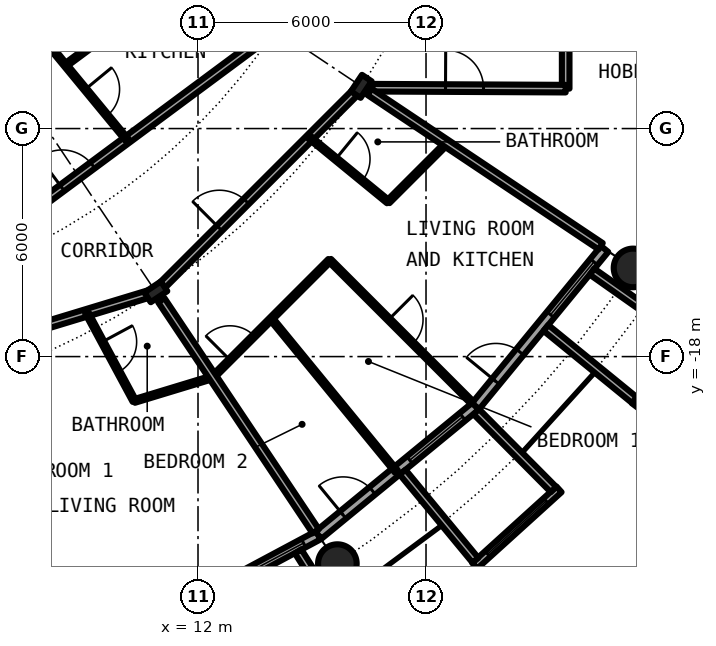
"""IFC4 building model, lengths in metres.
Left out: names, types, materials, properties, quantities, classifications, styles, units other than length and angle.
Written with IfcOpenShell. Run it as: python <this file> out.ifc"""

import sys

from ifc_helpers import new_model, si_unit, direction, frame, frame_2d, origin, origin_2d, place, context, subcontext, project, spatial, rectangle, circle, hollow_circle, i_section, extrude, element, fill, save


model = new_model("IFC4")
c1 = context("Model", 3, precision=1e-05, world=origin(), true_north=direction((0.0, 1.0)))
c2 = subcontext(c1, "Body", "Model", "MODEL_VIEW")
j1 = project(units=[si_unit("LENGTHUNIT", "METRE"), si_unit("PLANEANGLEUNIT", "RADIAN")], contexts=[c1])
p1 = place(None, origin())
s1 = spatial("IfcSite", under=j1, at=p1, CompositionType="ELEMENT")
p2 = place(p1, origin())
s2 = spatial("IfcBuilding", under=s1, at=p2, CompositionType="ELEMENT")
p3 = place(p2, frame((0.0, 0.0, 69.7)))
s3 = spatial("IfcBuildingStorey", under=s2, at=p3, CompositionType="ELEMENT", Elevation=69.7)
for number, where, z_axis, x_axis in (
    (1, (15.667, -23.448, 0.0), (0.0, 0.0, 1.0), (1.0, 0.0, 0.0)),
    (2, (23.448, -15.667, 0.0), (0.0, 0.0, 1.0), (1.0, 0.0, 0.0)),
):
    element("IfcColumn", number, at=place(p3, frame(where, z_axis=z_axis, x_axis=x_axis)), inside=s3, PredefinedType="COLUMN", context=c2, shape_type="SweptSolid", body=[
        extrude(hollow_circle(Radius=0.508, WallThickness=0.04, at=origin_2d()), origin(), (0.0, 0.0, 1.0), 3.05),
    ])
for number, where, z_axis, x_axis in (
    (3, (10.889, -16.297, 0.0), (0.0, 0.0, 1.0), (0.556, -0.831, 0.0)),
    (4, (16.297, -10.889, 0.0), (0.0, 0.0, 1.0), (0.831, -0.556, 0.0)),
):
    element("IfcColumn", number, at=place(p3, frame(where, z_axis=z_axis, x_axis=x_axis)), inside=s3, PredefinedType="COLUMN", context=c2, shape_type="SweptSolid", body=[
        extrude(i_section(OverallWidth=0.306, OverallDepth=0.524, WebThickness=0.021, FlangeThickness=0.04, FilletRadius=0.027, at=origin_2d()), origin(), (0.0, 0.0, 1.0), 3.05),
    ])
p4 = place(p3, frame((10.447, -25.222, 0.0), z_axis=(0.0, 0.0, 1.0), x_axis=(0.881915646801, 0.471407246368, 0.0)))
e5 = element("IfcWall", 5, at=p4, inside=s3, PredefinedType="SOLIDWALL", context=c2, shape_type="SweptSolid", body=[
    extrude(rectangle(XDim=5.352, YDim=0.25, at=frame_2d((2.676, 0.0))), origin(), (0.0, 0.0, 1.0), 2.7),
])
p5 = place(p4, frame((0.841, 0.0, 0.0)))
e6 = element("IfcOpeningElement", 6, at=p5, cuts=e5, PredefinedType="OPENING", context=c2, shape_type="SweptSolid", body=[
    extrude(rectangle(XDim=1.0, YDim=2.2, at=frame_2d((0.5, 1.1))), frame((0.0, 0.135, 0.0), z_axis=(0.0, -1.0, 0.0), x_axis=(1.0, 0.0, 0.0)), (0.0, 0.0, 1.0), 0.27),
])
p6 = place(p4, frame((3.111, 0.0, 0.3)))
e7 = element("IfcOpeningElement", 7, at=p6, cuts=e5, PredefinedType="OPENING", context=c2, shape_type="SweptSolid", body=[
    extrude(rectangle(XDim=1.8, YDim=2.1, at=frame_2d((0.9, 1.05))), frame((0.0, 0.135, 0.0), z_axis=(0.0, -1.0, 0.0), x_axis=(1.0, 0.0, 0.0)), (0.0, 0.0, 1.0), 0.27),
])
p7 = place(p3, frame((14.635, -23.126, -0.03), z_axis=(0.0, 0.0, 1.0), x_axis=(0.534437802731, -0.845207805816, 0.0)))
e8 = element("IfcWall", 8, at=p7, inside=s3, PredefinedType="SOLIDWALL", context=c2, shape_type="SweptSolid", body=[
    extrude(rectangle(XDim=2.932, YDim=0.2, at=frame_2d((1.466, 0.0))), origin(), (0.0, 0.0, 1.0), 2.73),
])
p8 = place(p3, frame((15.167, -22.699, 0.0), z_axis=(0.0, 0.0, 1.0), x_axis=(0.773019449054, 0.634382322723, 0.0)))
e9 = element("IfcWall", 9, at=p8, inside=s3, PredefinedType="SOLIDWALL", context=c2, shape_type="SweptSolid", body=[
    extrude(rectangle(XDim=5.352, YDim=0.25, at=frame_2d((2.676, 0.0))), origin(), (0.0, 0.0, 1.0), 2.7),
])
p9 = place(p8, frame((0.841, 0.0, 0.0)))
e10 = element("IfcOpeningElement", 10, at=p9, cuts=e9, PredefinedType="OPENING", context=c2, shape_type="SweptSolid", body=[
    extrude(rectangle(XDim=1.0, YDim=2.2, at=frame_2d((0.5, 1.1))), frame((0.0, 0.135, 0.0), z_axis=(0.0, -1.0, 0.0), x_axis=(1.0, 0.0, 0.0)), (0.0, 0.0, 1.0), 0.27),
])
p10 = place(p8, frame((3.111, 0.0, 0.3)))
e11 = element("IfcOpeningElement", 11, at=p10, cuts=e9, PredefinedType="OPENING", context=c2, shape_type="SweptSolid", body=[
    extrude(rectangle(XDim=1.8, YDim=2.1, at=frame_2d((0.9, 1.05))), frame((0.0, 0.135, 0.0), z_axis=(0.0, -1.0, 0.0), x_axis=(1.0, 0.0, 0.0)), (0.0, 0.0, 1.0), 0.27),
])
p11 = place(p3, frame((19.282, -23.503, -0.03), z_axis=(0.0, 0.0, 1.0), x_axis=(0.740998365753, 0.671506829416, 0.0)))
e12 = element("IfcWall", 12, at=p11, inside=s3, PredefinedType="SOLIDWALL", context=c2, shape_type="SweptSolid", body=[
    extrude(rectangle(XDim=2.993, YDim=0.2, at=frame_2d((1.497, 0.0))), origin(), (0.0, 0.0, 1.0), 2.73),
])
p12 = place(p11, frame((0.457, 0.0, 0.33)))
e13 = element("IfcOpeningElement", 13, at=p12, cuts=e12, PredefinedType="OPENING", context=c2, shape_type="SweptSolid", body=[
    extrude(circle(Radius=1.04, at=frame_2d((1.04, 1.04))), frame((0.0, 0.11, 0.0), z_axis=(0.0, -1.0, 0.0), x_axis=(1.0, 0.0, 0.0)), (0.0, 0.0, 1.0), 0.22),
])
p13 = place(p3, frame((17.384, -21.041, -0.03), z_axis=(0.0, 0.0, 1.0), x_axis=(0.63709551667, -0.770784861449, 0.0)))
e14 = element("IfcWall", 14, at=p13, inside=s3, PredefinedType="SOLIDWALL", context=c2, shape_type="SweptSolid", body=[
    extrude(rectangle(XDim=3.006, YDim=0.2, at=frame_2d((1.503, 0.0))), origin(), (0.0, 0.0, 1.0), 2.73),
])
p14 = place(p3, frame((19.323, -19.45, -0.03), z_axis=(0.0, 0.0, 1.0), x_axis=(0.704476739375, -0.709727076896, 0.0)))
e15 = element("IfcWall", 15, at=p14, inside=s3, PredefinedType="SOLIDWALL", context=c2, shape_type="SweptSolid", body=[
    extrude(rectangle(XDim=2.883, YDim=0.2, at=frame_2d((1.441, 0.0))), origin(), (0.0, 0.0, 1.0), 2.73),
])
p15 = place(p3, frame((19.304, -19.304, 0.0), z_axis=(0.0, 0.0, 1.0), x_axis=(0.634382322723, 0.773019449054, 0.0)))
e16 = element("IfcWall", 16, at=p15, inside=s3, PredefinedType="SOLIDWALL", context=c2, shape_type="SweptSolid", body=[
    extrude(rectangle(XDim=5.352, YDim=0.25, at=frame_2d((2.676, 0.0))), origin(), (0.0, 0.0, 1.0), 2.7),
])
p16 = place(p15, frame((0.841, 0.0, 0.0)))
e17 = element("IfcOpeningElement", 17, at=p16, cuts=e16, PredefinedType="OPENING", context=c2, shape_type="SweptSolid", body=[
    extrude(rectangle(XDim=1.0, YDim=2.2, at=frame_2d((0.5, 1.1))), frame((0.0, 0.135, 0.0), z_axis=(0.0, -1.0, 0.0), x_axis=(1.0, 0.0, 0.0)), (0.0, 0.0, 1.0), 0.27),
])
p17 = place(p15, frame((3.111, 0.0, 0.3)))
e18 = element("IfcOpeningElement", 18, at=p17, cuts=e16, PredefinedType="OPENING", context=c2, shape_type="SweptSolid", body=[
    extrude(rectangle(XDim=1.8, YDim=2.1, at=frame_2d((0.9, 1.05))), frame((0.0, 0.135, 0.0), z_axis=(0.0, -1.0, 0.0), x_axis=(1.0, 0.0, 0.0)), (0.0, 0.0, 1.0), 0.27),
])
p18 = place(p3, frame((23.497, -19.289, -0.03), z_axis=(0.0, 0.0, 1.0), x_axis=(0.60418752353, 0.796842165306, 0.0)))
e19 = element("IfcWall", 19, at=p18, inside=s3, PredefinedType="SOLIDWALL", context=c2, shape_type="SweptSolid", body=[
    extrude(rectangle(XDim=2.337, YDim=0.2, at=frame_2d((1.168, 0.0))), origin(), (0.0, 0.0, 1.0), 2.73),
])
p19 = place(p18, frame((0.128, 0.0, 0.33)))
e20 = element("IfcOpeningElement", 20, at=p19, cuts=e19, PredefinedType="OPENING", context=c2, shape_type="SweptSolid", body=[
    extrude(circle(Radius=1.04, at=frame_2d((1.04, 1.04))), frame((0.0, 0.11, 0.0), z_axis=(0.0, -1.0, 0.0), x_axis=(1.0, 0.0, 0.0)), (0.0, 0.0, 1.0), 0.22),
])
p20 = place(p3, frame((21.155, -17.246, -0.03), z_axis=(0.0, 0.0, 1.0), x_axis=(0.775179004516, -0.631741648902, 0.0)))
e21 = element("IfcWall", 21, at=p20, inside=s3, PredefinedType="SOLIDWALL", context=c2, shape_type="SweptSolid", body=[
    extrude(rectangle(XDim=3.006, YDim=0.2, at=frame_2d((1.503, 0.0))), origin(), (0.0, 0.0, 1.0), 2.73),
])
p21 = place(p3, frame((22.37, -15.765, -0.03), z_axis=(0.0, 0.0, 1.0), x_axis=(0.817256123454, -0.576274612209, 0.0)))
e22 = element("IfcWall", 22, at=p21, inside=s3, PredefinedType="SOLIDWALL", context=c2, shape_type="SweptSolid", body=[
    extrude(rectangle(XDim=2.933, YDim=0.2, at=frame_2d((1.466, 0.0))), origin(), (0.0, 0.0, 1.0), 2.73),
])
p22 = place(p3, frame((12.386, -18.545, 0.0), z_axis=(0.0, 0.0, 1.0), x_axis=(0.707106781187, 0.707106781187, 0.0)))
e23 = element("IfcWall", 23, at=p22, inside=s3, PredefinedType="PARTITIONING", context=c2, shape_type="SweptSolid", body=[
    extrude(rectangle(XDim=4.351, YDim=0.1, at=frame_2d((2.176, 0.0))), origin(), (0.0, 0.0, 1.0), 2.7),
])
p23 = place(p22, frame((0.644, 0.0, 0.0)))
e24 = element("IfcOpeningElement", 24, at=p23, cuts=e23, PredefinedType="OPENING", context=c2, shape_type="SweptSolid", body=[
    extrude(rectangle(XDim=0.9, YDim=2.3, at=frame_2d((0.45, 1.15))), frame((0.0, 0.06, 0.0), z_axis=(0.0, -1.0, 0.0), x_axis=(1.0, 0.0, 0.0)), (0.0, 0.0, 1.0), 0.12),
])
p24 = place(p3, frame((17.004, -13.927, 0.0), z_axis=(0.0, 0.0, 1.0), x_axis=(0.707106781187, 0.707106781187, 0.0)))
e25 = element("IfcWall", 25, at=p24, inside=s3, PredefinedType="PARTITIONING", context=c2, shape_type="SweptSolid", body=[
    extrude(rectangle(XDim=2.175, YDim=0.1, at=frame_2d((1.088, 0.0))), origin(), (0.0, 0.0, 1.0), 2.7),
])
p25 = place(p3, frame((21.675, -10.95, 0.0), z_axis=(0.0, 0.0, 1.0), x_axis=(0.0, 1.0, 0.0)))
e26 = element("IfcWall", 26, at=p25, inside=s3, PredefinedType="PARTITIONING", context=c2, shape_type="SweptSolid", body=[
    extrude(rectangle(XDim=1.65, YDim=0.2, at=frame_2d((0.825, 0.0))), origin(), (0.0, 0.0, 1.0), 2.7),
])
p26 = place(p3, frame((10.327, -19.168, 0.0), z_axis=(0.0, 0.0, 1.0), x_axis=(0.956877769253, 0.290490851335, 0.0)))
e27 = element("IfcWall", 27, at=p26, inside=s3, PredefinedType="PARTITIONING", context=c2, shape_type="SweptSolid", body=[
    extrude(rectangle(XDim=2.158, YDim=0.1, at=frame_2d((1.079, 0.0))), origin(), (0.0, 0.0, 1.0), 2.7),
])
p27 = place(p3, frame((11.0, -16.186, 0.0), z_axis=(0.0, 0.0, 1.0), x_axis=(0.707106781187, 0.707106781187, 0.0)))
e28 = element("IfcWall", 28, at=p27, inside=s3, PredefinedType="PARTITIONING", context=c2, shape_type="SweptSolid", body=[
    extrude(rectangle(XDim=7.334, YDim=0.2, at=frame_2d((3.667, 0.0))), origin(), (0.0, 0.0, 1.0), 2.38),
])
p28 = place(p27, frame((2.211, 0.0, 0.0)))
e29 = element("IfcOpeningElement", 29, at=p28, cuts=e28, PredefinedType="OPENING", context=c2, shape_type="SweptSolid", body=[
    extrude(rectangle(XDim=1.0, YDim=2.3, at=frame_2d((0.5, 1.15))), frame((0.0, 0.11, 0.0), z_axis=(0.0, -1.0, 0.0), x_axis=(1.0, 0.0, 0.0)), (0.0, 0.0, 1.0), 0.22),
])
p29 = place(p3, frame((0.0, -19.6, 0.0), z_axis=(0.0, 0.0, 1.0), x_axis=(0.956932298225, 0.290311172044, 0.0)))
e30 = element("IfcWall", 30, at=p29, inside=s3, PredefinedType="PARTITIONING", context=c2, shape_type="SweptSolid", body=[
    extrude(rectangle(XDim=11.219, YDim=0.2, at=frame_2d((5.61, 0.0))), origin(), (0.0, 0.0, 1.0), 2.38),
])
p30 = place(p29, frame((7.086, 0.0, 0.0)))
e31 = element("IfcOpeningElement", 31, at=p30, cuts=e30, PredefinedType="OPENING", context=c2, shape_type="SweptSolid", body=[
    extrude(rectangle(XDim=1.0, YDim=2.3, at=frame_2d((0.5, 1.15))), frame((0.0, 0.11, 0.0), z_axis=(0.0, -1.0, 0.0), x_axis=(1.0, 0.0, 0.0)), (0.0, 0.0, 1.0), 0.22),
])
p31 = place(p3, frame((4.906, -16.172, 0.0), z_axis=(0.0, 0.0, 1.0), x_axis=(0.803204584823, 0.59570327758, 0.0)))
e32 = element("IfcWall", 32, at=p31, inside=s3, PredefinedType="PARTITIONING", context=c2, shape_type="SweptSolid", body=[
    extrude(rectangle(XDim=11.387, YDim=0.2, at=frame_2d((5.693, 0.0))), origin(), (0.0, 0.0, 1.0), 2.7),
])
p32 = place(p31, frame((4.38, 0.0, 0.0)))
e33 = element("IfcOpeningElement", 33, at=p32, cuts=e32, PredefinedType="OPENING", context=c2, shape_type="SweptSolid", body=[
    extrude(rectangle(XDim=1.0, YDim=2.3, at=frame_2d((0.5, 1.15))), frame((0.0, 0.11, 0.0), z_axis=(0.0, -1.0, 0.0), x_axis=(1.0, 0.0, 0.0)), (0.0, 0.0, 1.0), 0.22),
])
p33 = place(p3, frame((8.513, -10.332, 0.0), z_axis=(0.0, 0.0, 1.0), x_axis=(0.803135014325, 0.595797070121, 0.0)))
e34 = element("IfcWall", 34, at=p33, inside=s3, PredefinedType="PARTITIONING", context=c2, shape_type="SweptSolid", body=[
    extrude(rectangle(XDim=1.732, YDim=0.1, at=frame_2d((0.866, 0.0))), origin(), (0.0, 0.0, 1.0), 2.7),
])
p34 = place(p3, frame((16.588, -10.925, 0.0), z_axis=(0.0, 0.0, 1.0), x_axis=(0.999988019025, -0.004895079807, 0.0)))
e35 = element("IfcWall", 35, at=p34, inside=s3, PredefinedType="PARTITIONING", context=c2, shape_type="SweptSolid", body=[
    extrude(rectangle(XDim=5.087, YDim=0.2, at=frame_2d((2.543, 0.0))), origin(), (0.0, 0.0, 1.0), 2.7),
])
p35 = place(p34, frame((1.925, 0.0, 0.0)))
e36 = element("IfcOpeningElement", 36, at=p35, cuts=e35, PredefinedType="OPENING", context=c2, shape_type="SweptSolid", body=[
    extrude(rectangle(XDim=1.0, YDim=2.3, at=frame_2d((0.5, 1.15))), frame((0.0, 0.11, 0.0), z_axis=(0.0, -1.0, 0.0), x_axis=(1.0, 0.0, 0.0)), (0.0, 0.0, 1.0), 0.22),
])
p36 = place(p3, frame((4.908, -5.959, 0.0), z_axis=(0.0, 0.0, 1.0), x_axis=(0.636105207978, -0.771602335652, 0.0)))
e37 = element("IfcWall", 37, at=p36, inside=s3, PredefinedType="PARTITIONING", context=c2, shape_type="SweptSolid", body=[
    extrude(rectangle(XDim=8.213, YDim=0.1, at=frame_2d((4.106, 0.0))), origin(), (0.0, 0.0, 1.0), 2.7),
])
p37 = place(p36, frame((6.49, 0.0, 0.0)))
e38 = element("IfcOpeningElement", 38, at=p37, cuts=e37, PredefinedType="OPENING", context=c2, shape_type="SweptSolid", body=[
    extrude(rectangle(XDim=0.9, YDim=2.3, at=frame_2d((0.45, 1.15))), frame((0.0, 0.06, 0.0), z_axis=(0.0, -1.0, 0.0), x_axis=(1.0, 0.0, 0.0)), (0.0, 0.0, 1.0), 0.12),
])
p38 = place(p36, frame((2.384, 0.0, 0.0)))
e39 = element("IfcOpeningElement", 39, at=p38, cuts=e37, PredefinedType="OPENING", context=c2, shape_type="SweptSolid", body=[
    extrude(rectangle(XDim=0.9, YDim=2.3, at=frame_2d((0.45, 1.15))), frame((0.0, 0.06, 0.0), z_axis=(0.0, -1.0, 0.0), x_axis=(1.0, 0.0, 0.0)), (0.0, 0.0, 1.0), 0.12),
])
p39 = place(p3, frame((9.074, -16.847, 0.0), z_axis=(0.0, 0.0, 1.0), x_axis=(0.474160570331, -0.880438387136, 0.0)))
e40 = element("IfcWall", 40, at=p39, inside=s3, PredefinedType="PARTITIONING", context=c2, shape_type="SweptSolid", body=[
    extrude(rectangle(XDim=2.636, YDim=0.1, at=frame_2d((1.318, 0.0))), origin(), (0.0, 0.0, 1.0), 2.7),
])
p40 = place(p39, frame((0.868, 0.0, 0.0)))
e41 = element("IfcOpeningElement", 41, at=p40, cuts=e40, PredefinedType="OPENING", context=c2, shape_type="SweptSolid", body=[
    extrude(rectangle(XDim=0.9, YDim=2.3, at=frame_2d((0.45, 1.15))), frame((0.0, 0.06, 0.0), z_axis=(0.0, -1.0, 0.0), x_axis=(1.0, 0.0, 0.0)), (0.0, 0.0, 1.0), 0.12),
])
p41 = place(p3, frame((11.034, -16.515, 0.0), z_axis=(0.0, 0.0, 1.0), x_axis=(0.555701298605, -0.831382022135, 0.0)))
e42 = element("IfcWall", 42, at=p41, inside=s3, PredefinedType="PARTITIONING", context=c2, shape_type="SweptSolid", body=[
    extrude(rectangle(XDim=7.313, YDim=0.2, at=frame_2d((3.657, 0.0))), origin(), (0.0, 0.0, 1.0), 2.7),
])
p42 = place(p3, frame((13.927, -17.004, 0.0), z_axis=(0.0, 0.0, 1.0), x_axis=(0.633774976367, -0.773517471898, 0.0)))
e43 = element("IfcWall", 43, at=p42, inside=s3, PredefinedType="PARTITIONING", context=c2, shape_type="SweptSolid", body=[
    extrude(rectangle(XDim=5.196, YDim=0.1, at=frame_2d((2.598, 0.0))), origin(), (0.0, 0.0, 1.0), 2.7),
])
p43 = place(p3, frame((14.945, -12.241, 0.0), z_axis=(0.0, 0.0, 1.0), x_axis=(0.77367517848, -0.633582447834, 0.0)))
e44 = element("IfcWall", 44, at=p43, inside=s3, PredefinedType="PARTITIONING", context=c2, shape_type="SweptSolid", body=[
    extrude(rectangle(XDim=2.661, YDim=0.1, at=frame_2d((1.331, 0.0))), origin(), (0.0, 0.0, 1.0), 2.7),
])
p44 = place(p43, frame((0.881, 0.0, 0.0)))
e45 = element("IfcOpeningElement", 45, at=p44, cuts=e44, PredefinedType="OPENING", context=c2, shape_type="SweptSolid", body=[
    extrude(rectangle(XDim=0.9, YDim=2.3, at=frame_2d((0.45, 1.15))), frame((0.0, 0.06, 0.0), z_axis=(0.0, -1.0, 0.0), x_axis=(1.0, 0.0, 0.0)), (0.0, 0.0, 1.0), 0.12),
])
p45 = place(p3, frame((15.465, -15.465, 0.0), z_axis=(0.0, 0.0, 1.0), x_axis=(0.707106781187, -0.707106781187, 0.0)))
e46 = element("IfcWall", 46, at=p45, inside=s3, PredefinedType="PARTITIONING", context=c2, shape_type="SweptSolid", body=[
    extrude(rectangle(XDim=5.305, YDim=0.1, at=frame_2d((2.652, 0.0))), origin(), (0.0, 0.0, 1.0), 2.7),
])
p46 = place(p45, frame((2.202, 0.0, 0.0)))
e47 = element("IfcOpeningElement", 47, at=p46, cuts=e46, PredefinedType="OPENING", context=c2, shape_type="SweptSolid", body=[
    extrude(rectangle(XDim=0.9, YDim=2.3, at=frame_2d((0.45, 1.15))), frame((0.0, 0.06, 0.0), z_axis=(0.0, -1.0, 0.0), x_axis=(1.0, 0.0, 0.0)), (0.0, 0.0, 1.0), 0.12),
])
p47 = place(p3, frame((16.515, -11.035, 0.0), z_axis=(0.0, 0.0, 1.0), x_axis=(0.831505405283, -0.555516661303, 0.0)))
e48 = element("IfcWall", 48, at=p47, inside=s3, PredefinedType="PARTITIONING", context=c2, shape_type="SweptSolid", body=[
    extrude(rectangle(XDim=7.312, YDim=0.2, at=frame_2d((3.656, 0.0))), origin(), (0.0, 0.0, 1.0), 2.7),
])
p48 = place(p6, origin())
e49 = element("IfcWindow", 49, at=p48, inside=s3, PartitioningType="SINGLE_PANEL", PredefinedType="WINDOW", context=c2, shape_type="SweptSolid", body=[
    extrude(rectangle(XDim=1.8, YDim=2.1, at=frame_2d((0.9, 1.05))), frame((0.0, 0.03, 0.0), z_axis=(0.0, -1.0, 0.0), x_axis=(1.0, 0.0, 0.0)), (0.0, 0.0, 1.0), 0.06),
])
fill(e7, e49)
p49 = place(p9, origin())
e50 = element("IfcDoor", 50, at=p49, inside=s3, OperationType="SINGLE_SWING_LEFT", PredefinedType="DOOR", context=c2, shape_type="SweptSolid", body=[
    extrude(rectangle(XDim=1.0, YDim=2.2, at=frame_2d((0.5, 1.1))), frame((0.0, 0.025, 0.0), z_axis=(0.0, -1.0, 0.0), x_axis=(1.0, 0.0, 0.0)), (0.0, 0.0, 1.0), 0.05),
])
fill(e10, e50)
p50 = place(p10, origin())
e51 = element("IfcWindow", 51, at=p50, inside=s3, PartitioningType="SINGLE_PANEL", PredefinedType="WINDOW", context=c2, shape_type="SweptSolid", body=[
    extrude(rectangle(XDim=1.8, YDim=2.1, at=frame_2d((0.9, 1.05))), frame((0.0, 0.03, 0.0), z_axis=(0.0, -1.0, 0.0), x_axis=(1.0, 0.0, 0.0)), (0.0, 0.0, 1.0), 0.06),
])
fill(e11, e51)
p51 = place(p12, origin())
e52 = element("IfcWindow", 52, at=p51, inside=s3, PartitioningType="SINGLE_PANEL", PredefinedType="WINDOW", context=c2, shape_type="SweptSolid", body=[
    extrude(circle(Radius=1.04, at=frame_2d((1.04, 1.04))), frame((0.0, 0.03, 0.0), z_axis=(0.0, -1.0, 0.0), x_axis=(1.0, 0.0, 0.0)), (0.0, 0.0, 1.0), 0.06),
])
fill(e13, e52)
p52 = place(p16, origin())
e53 = element("IfcDoor", 53, at=p52, inside=s3, OperationType="SINGLE_SWING_LEFT", PredefinedType="DOOR", context=c2, shape_type="SweptSolid", body=[
    extrude(rectangle(XDim=1.0, YDim=2.2, at=frame_2d((0.5, 1.1))), frame((0.0, 0.025, 0.0), z_axis=(0.0, -1.0, 0.0), x_axis=(1.0, 0.0, 0.0)), (0.0, 0.0, 1.0), 0.05),
])
fill(e17, e53)
p53 = place(p17, origin())
e54 = element("IfcWindow", 54, at=p53, inside=s3, PartitioningType="SINGLE_PANEL", PredefinedType="WINDOW", context=c2, shape_type="SweptSolid", body=[
    extrude(rectangle(XDim=1.8, YDim=2.1, at=frame_2d((0.9, 1.05))), frame((0.0, 0.03, 0.0), z_axis=(0.0, -1.0, 0.0), x_axis=(1.0, 0.0, 0.0)), (0.0, 0.0, 1.0), 0.06),
])
fill(e18, e54)
p54 = place(p40, origin())
e55 = element("IfcDoor", 55, at=p54, inside=s3, OperationType="SINGLE_SWING_RIGHT", PredefinedType="DOOR", context=c2, shape_type="SweptSolid", body=[
    extrude(rectangle(XDim=0.9, YDim=2.3, at=frame_2d((0.45, 1.15))), frame((0.0, 0.025, 0.0), z_axis=(0.0, -1.0, 0.0), x_axis=(1.0, 0.0, 0.0)), (0.0, 0.0, 1.0), 0.05),
])
fill(e41, e55)
p55 = place(p28, origin())
e56 = element("IfcDoor", 56, at=p55, inside=s3, OperationType="SINGLE_SWING_LEFT", PredefinedType="DOOR", context=c2, shape_type="SweptSolid", body=[
    extrude(rectangle(XDim=1.0, YDim=2.3, at=frame_2d((0.5, 1.15))), frame((0.0, 0.025, 0.0), z_axis=(0.0, -1.0, 0.0), x_axis=(1.0, 0.0, 0.0)), (0.0, 0.0, 1.0), 0.05),
])
fill(e29, e56)
p56 = place(p44, origin())
e57 = element("IfcDoor", 57, at=p56, inside=s3, OperationType="SINGLE_SWING_LEFT", PredefinedType="DOOR", context=c2, shape_type="SweptSolid", body=[
    extrude(rectangle(XDim=0.9, YDim=2.3, at=frame_2d((0.45, 1.15))), frame((0.0, 0.025, 0.0), z_axis=(0.0, -1.0, 0.0), x_axis=(1.0, 0.0, 0.0)), (0.0, 0.0, 1.0), 0.05),
])
fill(e45, e57)
p57 = place(p46, origin())
e58 = element("IfcDoor", 58, at=p57, inside=s3, OperationType="SINGLE_SWING_RIGHT", PredefinedType="DOOR", context=c2, shape_type="SweptSolid", body=[
    extrude(rectangle(XDim=0.9, YDim=2.3, at=frame_2d((0.45, 1.15))), frame((0.0, 0.025, 0.0), z_axis=(0.0, -1.0, 0.0), x_axis=(1.0, 0.0, 0.0)), (0.0, 0.0, 1.0), 0.05),
])
fill(e47, e58)
p58 = place(p23, origin())
e59 = element("IfcDoor", 59, at=p58, inside=s3, OperationType="SINGLE_SWING_LEFT", PredefinedType="DOOR", context=c2, shape_type="SweptSolid", body=[
    extrude(rectangle(XDim=0.9, YDim=2.3, at=frame_2d((0.45, 1.15))), frame((0.0, 0.025, 0.0), z_axis=(0.0, -1.0, 0.0), x_axis=(1.0, 0.0, 0.0)), (0.0, 0.0, 1.0), 0.05),
])
fill(e24, e59)
p59 = place(p32, origin())
e60 = element("IfcDoor", 60, at=p59, inside=s3, OperationType="SINGLE_SWING_LEFT", PredefinedType="DOOR", context=c2, shape_type="SweptSolid", body=[
    extrude(rectangle(XDim=1.0, YDim=2.3, at=frame_2d((0.5, 1.15))), frame((0.0, 0.025, 0.0), z_axis=(0.0, -1.0, 0.0), x_axis=(1.0, 0.0, 0.0)), (0.0, 0.0, 1.0), 0.05),
])
fill(e33, e60)
p60 = place(p37, origin())
e61 = element("IfcDoor", 61, at=p60, inside=s3, OperationType="SINGLE_SWING_RIGHT", PredefinedType="DOOR", context=c2, shape_type="SweptSolid", body=[
    extrude(rectangle(XDim=0.9, YDim=2.3, at=frame_2d((0.45, 1.15))), frame((0.0, 0.025, 0.0), z_axis=(0.0, -1.0, 0.0), x_axis=(1.0, 0.0, 0.0)), (0.0, 0.0, 1.0), 0.05),
])
fill(e38, e61)
p61 = place(p35, origin())
e62 = element("IfcDoor", 62, at=p61, inside=s3, OperationType="SINGLE_SWING_LEFT", PredefinedType="DOOR", context=c2, shape_type="SweptSolid", body=[
    extrude(rectangle(XDim=1.0, YDim=2.3, at=frame_2d((0.5, 1.15))), frame((0.0, 0.025, 0.0), z_axis=(0.0, -1.0, 0.0), x_axis=(1.0, 0.0, 0.0)), (0.0, 0.0, 1.0), 0.05),
])
fill(e36, e62)
save(model, sys.argv[1])
